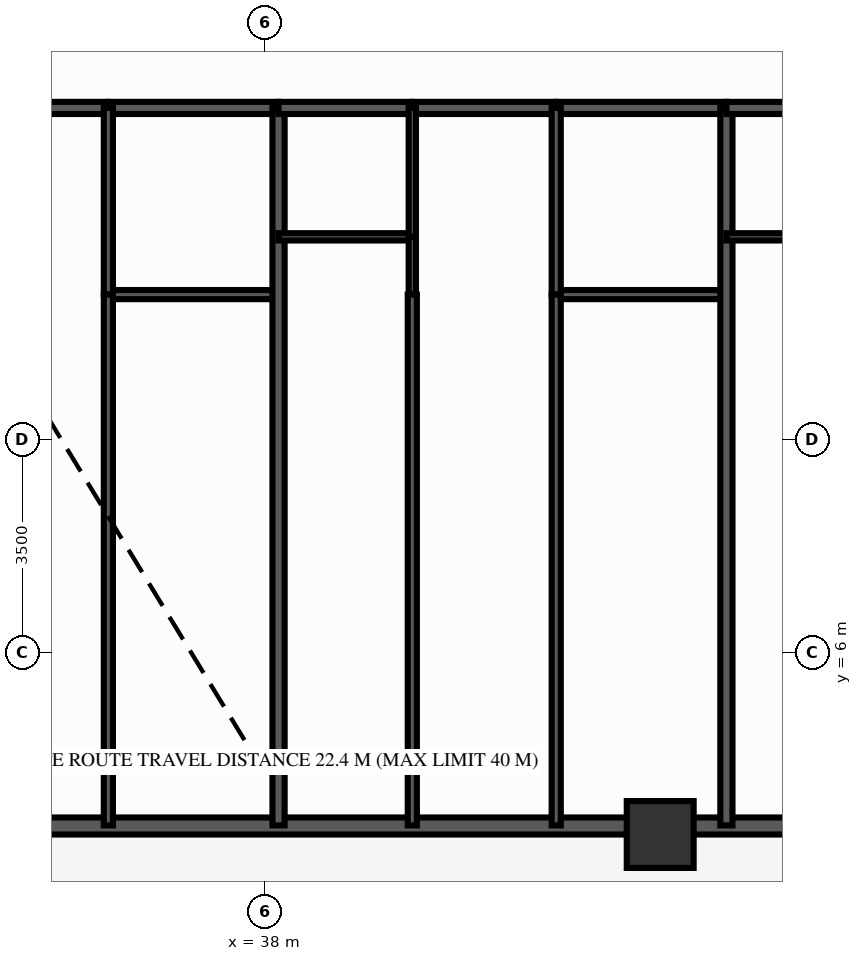
"""IFC4 building model, lengths in metres.
Left out: names, types, materials, properties, quantities, classifications, styles, units other than length and angle.
Written with IfcOpenShell. Run it as: python <this file> out.ifc"""

import sys

from ifc_helpers import new_model, si_unit, direction, frame, frame_2d, origin, origin_2d, place, context, subcontext, project, spatial, rectangle, extrude, source, transform, mapped, element, fill, save


model = new_model("IFC4")
c1 = context("Model", 3, precision=1e-05, world=origin(), true_north=direction((0.0, 1.0)))
c2 = subcontext(c1, "Body", "Model", "MODEL_VIEW")
j1 = project(units=[si_unit("LENGTHUNIT", "METRE"), si_unit("PLANEANGLEUNIT", "RADIAN")], contexts=[c1])
p1 = place(None, origin())
s1 = spatial("IfcSite", under=j1, at=p1, CompositionType="ELEMENT")
p2 = place(p1, origin())
s2 = spatial("IfcBuilding", under=s1, at=p2, CompositionType="ELEMENT")
p3 = place(p2, frame((0.0, 0.0, 19.4)))
s3 = spatial("IfcBuildingStorey", under=s2, at=p3, CompositionType="ELEMENT", Elevation=19.4)
m1 = source(origin(), c2, "Body", "SweptSolid", [
    extrude(rectangle(XDim=1.1, YDim=1.1, at=origin_2d()), origin(), (0.0, 0.0, 1.0), 3.0),
])
p4 = place(p3, frame((44.5, 3.0, 0.0), z_axis=(0.0, 0.0, 1.0), x_axis=(1.0, 0.0, 0.0)))
e1 = element("IfcColumn", 1, at=p4, inside=s3, PredefinedType="COLUMN", context=c2, shape_type="MappedRepresentation", body=[
    mapped(m1, transform((0.0, 0.0, 0.0), scale=1.0)),
])
p5 = place(p3, frame((15.5, 3.14, 0.0), z_axis=(0.0, 0.0, 1.0), x_axis=(1.0, 0.0, 0.0)))
e2 = element("IfcWall", 2, at=p5, inside=s3, PredefinedType="SOLIDWALL", context=c2, shape_type="SweptSolid", body=[
    extrude(rectangle(XDim=45.0, YDim=0.28, at=frame_2d((22.5, 0.0))), origin(), (0.0, 0.0, 1.0), 2.28),
])
p6 = place(p5, frame((0.785, 0.0, 0.25)))
e3 = element("IfcOpeningElement", 3, at=p6, cuts=e2, PredefinedType="OPENING", context=c2, shape_type="SweptSolid", body=[
    extrude(rectangle(XDim=1.2, YDim=1.5, at=frame_2d((0.6, 0.75))), frame((0.0, 0.152, 0.0), z_axis=(0.0, -1.0, 0.0), x_axis=(1.0, 0.0, 0.0)), (0.0, 0.0, 1.0), 0.304),
])
p7 = place(p5, frame((3.033, 0.0, 0.25)))
e4 = element("IfcOpeningElement", 4, at=p7, cuts=e2, PredefinedType="OPENING", context=c2, shape_type="SweptSolid", body=[
    extrude(rectangle(XDim=1.2, YDim=1.5, at=frame_2d((0.6, 0.75))), frame((0.0, 0.152, 0.0), z_axis=(0.0, -1.0, 0.0), x_axis=(1.0, 0.0, 0.0)), (0.0, 0.0, 1.0), 0.304),
])
p8 = place(p5, frame((5.727, 0.0, 0.25)))
e5 = element("IfcOpeningElement", 5, at=p8, cuts=e2, PredefinedType="OPENING", context=c2, shape_type="SweptSolid", body=[
    extrude(rectangle(XDim=1.2, YDim=1.5, at=frame_2d((0.6, 0.75))), frame((0.0, 0.152, 0.0), z_axis=(0.0, -1.0, 0.0), x_axis=(1.0, 0.0, 0.0)), (0.0, 0.0, 1.0), 0.304),
])
p9 = place(p5, frame((8.269, 0.0, 0.25)))
e6 = element("IfcOpeningElement", 6, at=p9, cuts=e2, PredefinedType="OPENING", context=c2, shape_type="SweptSolid", body=[
    extrude(rectangle(XDim=1.2, YDim=1.5, at=frame_2d((0.6, 0.75))), frame((0.0, 0.152, 0.0), z_axis=(0.0, -1.0, 0.0), x_axis=(1.0, 0.0, 0.0)), (0.0, 0.0, 1.0), 0.304),
])
p10 = place(p5, frame((10.621, 0.0, 0.25)))
e7 = element("IfcOpeningElement", 7, at=p10, cuts=e2, PredefinedType="OPENING", context=c2, shape_type="SweptSolid", body=[
    extrude(rectangle(XDim=1.2, YDim=1.5, at=frame_2d((0.6, 0.75))), frame((0.0, 0.152, 0.0), z_axis=(0.0, -1.0, 0.0), x_axis=(1.0, 0.0, 0.0)), (0.0, 0.0, 1.0), 0.304),
])
p11 = place(p5, frame((13.316, 0.0, 0.25)))
e8 = element("IfcOpeningElement", 8, at=p11, cuts=e2, PredefinedType="OPENING", context=c2, shape_type="SweptSolid", body=[
    extrude(rectangle(XDim=1.2, YDim=1.5, at=frame_2d((0.6, 0.75))), frame((0.0, 0.152, 0.0), z_axis=(0.0, -1.0, 0.0), x_axis=(1.0, 0.0, 0.0)), (0.0, 0.0, 1.0), 0.304),
])
p12 = place(p5, frame((16.624, 0.0, 0.25)))
e9 = element("IfcOpeningElement", 9, at=p12, cuts=e2, PredefinedType="OPENING", context=c2, shape_type="SweptSolid", body=[
    extrude(rectangle(XDim=0.7, YDim=1.5, at=frame_2d((0.35, 0.75))), frame((0.0, 0.152, 0.0), z_axis=(0.0, -1.0, 0.0), x_axis=(1.0, 0.0, 0.0)), (0.0, 0.0, 1.0), 0.304),
])
p13 = place(p5, frame((18.141, 0.0, 0.25)))
e10 = element("IfcOpeningElement", 10, at=p13, cuts=e2, PredefinedType="OPENING", context=c2, shape_type="SweptSolid", body=[
    extrude(rectangle(XDim=1.2, YDim=1.5, at=frame_2d((0.6, 0.75))), frame((0.0, 0.152, 0.0), z_axis=(0.0, -1.0, 0.0), x_axis=(1.0, 0.0, 0.0)), (0.0, 0.0, 1.0), 0.304),
])
p14 = place(p5, frame((21.874, 0.0, 0.0), z_axis=(0.0, 0.0, 1.0), x_axis=(-1.0, 0.0, 0.0)))
e11 = element("IfcOpeningElement", 11, at=p14, cuts=e2, PredefinedType="OPENING", context=c2, shape_type="SweptSolid", body=[
    extrude(rectangle(XDim=1.1, YDim=2.15, at=frame_2d((0.55, 1.075))), frame((0.0, 0.152, 0.0), z_axis=(0.0, -1.0, 0.0), x_axis=(1.0, 0.0, 0.0)), (0.0, 0.0, 1.0), 0.304),
])
p15 = place(p5, frame((23.223, 0.0, 0.25)))
e12 = element("IfcOpeningElement", 12, at=p15, cuts=e2, PredefinedType="OPENING", context=c2, shape_type="SweptSolid", body=[
    extrude(rectangle(XDim=1.2, YDim=1.5, at=frame_2d((0.6, 0.75))), frame((0.0, 0.152, 0.0), z_axis=(0.0, -1.0, 0.0), x_axis=(1.0, 0.0, 0.0)), (0.0, 0.0, 1.0), 0.304),
])
p16 = place(p5, frame((25.507, 0.0, 0.25)))
e13 = element("IfcOpeningElement", 13, at=p16, cuts=e2, PredefinedType="OPENING", context=c2, shape_type="SweptSolid", body=[
    extrude(rectangle(XDim=1.2, YDim=1.5, at=frame_2d((0.6, 0.75))), frame((0.0, 0.152, 0.0), z_axis=(0.0, -1.0, 0.0), x_axis=(1.0, 0.0, 0.0)), (0.0, 0.0, 1.0), 0.304),
])
p17 = place(p5, frame((27.6, 0.0, 0.25)))
e14 = element("IfcOpeningElement", 14, at=p17, cuts=e2, PredefinedType="OPENING", context=c2, shape_type="SweptSolid", body=[
    extrude(rectangle(XDim=0.7, YDim=1.5, at=frame_2d((0.35, 0.75))), frame((0.0, 0.152, 0.0), z_axis=(0.0, -1.0, 0.0), x_axis=(1.0, 0.0, 0.0)), (0.0, 0.0, 1.0), 0.304),
])
p18 = place(p5, frame((30.589, 0.0, 0.25)))
e15 = element("IfcOpeningElement", 15, at=p18, cuts=e2, PredefinedType="OPENING", context=c2, shape_type="SweptSolid", body=[
    extrude(rectangle(XDim=1.2, YDim=1.5, at=frame_2d((0.6, 0.75))), frame((0.0, 0.152, 0.0), z_axis=(0.0, -1.0, 0.0), x_axis=(1.0, 0.0, 0.0)), (0.0, 0.0, 1.0), 0.304),
])
p19 = place(p5, frame((32.872, 0.0, 0.25)))
e16 = element("IfcOpeningElement", 16, at=p19, cuts=e2, PredefinedType="OPENING", context=c2, shape_type="SweptSolid", body=[
    extrude(rectangle(XDim=1.2, YDim=1.5, at=frame_2d((0.6, 0.75))), frame((0.0, 0.152, 0.0), z_axis=(0.0, -1.0, 0.0), x_axis=(1.0, 0.0, 0.0)), (0.0, 0.0, 1.0), 0.304),
])
p20 = place(p5, frame((35.455, 0.0, 0.25)))
e17 = element("IfcOpeningElement", 17, at=p20, cuts=e2, PredefinedType="OPENING", context=c2, shape_type="SweptSolid", body=[
    extrude(rectangle(XDim=1.2, YDim=1.5, at=frame_2d((0.6, 0.75))), frame((0.0, 0.152, 0.0), z_axis=(0.0, -1.0, 0.0), x_axis=(1.0, 0.0, 0.0)), (0.0, 0.0, 1.0), 0.304),
])
p21 = place(p5, frame((37.954, 0.0, 0.25)))
e18 = element("IfcOpeningElement", 18, at=p21, cuts=e2, PredefinedType="OPENING", context=c2, shape_type="SweptSolid", body=[
    extrude(rectangle(XDim=1.2, YDim=1.5, at=frame_2d((0.6, 0.75))), frame((0.0, 0.152, 0.0), z_axis=(0.0, -1.0, 0.0), x_axis=(1.0, 0.0, 0.0)), (0.0, 0.0, 1.0), 0.304),
])
p22 = place(p5, frame((40.238, 0.0, 0.25)))
e19 = element("IfcOpeningElement", 19, at=p22, cuts=e2, PredefinedType="OPENING", context=c2, shape_type="SweptSolid", body=[
    extrude(rectangle(XDim=1.2, YDim=1.5, at=frame_2d((0.6, 0.75))), frame((0.0, 0.152, 0.0), z_axis=(0.0, -1.0, 0.0), x_axis=(1.0, 0.0, 0.0)), (0.0, 0.0, 1.0), 0.304),
])
p23 = place(p5, frame((42.716, 0.0, 0.25)))
e20 = element("IfcOpeningElement", 20, at=p23, cuts=e2, PredefinedType="OPENING", context=c2, shape_type="SweptSolid", body=[
    extrude(rectangle(XDim=1.2, YDim=1.5, at=frame_2d((0.6, 0.75))), frame((0.0, 0.152, 0.0), z_axis=(0.0, -1.0, 0.0), x_axis=(1.0, 0.0, 0.0)), (0.0, 0.0, 1.0), 0.304),
])
p24 = place(p3, frame((33.058, 14.95, 0.0), z_axis=(0.0, 0.0, 1.0), x_axis=(1.0, 0.0, 0.0)))
e21 = element("IfcWall", 21, at=p24, inside=s3, PredefinedType="PARTITIONING", context=c2, shape_type="SweptSolid", body=[
    extrude(rectangle(XDim=2.367, YDim=0.2, at=frame_2d((1.183, 0.0))), origin(), (0.0, 0.0, 1.0), 2.79),
])
p25 = place(p24, frame((0.683, 0.0, 0.0)))
e22 = element("IfcOpeningElement", 22, at=p25, cuts=e21, PredefinedType="OPENING", context=c2, shape_type="SweptSolid", body=[
    extrude(rectangle(XDim=1.0, YDim=2.15, at=frame_2d((0.5, 1.075))), frame((0.0, 0.112, 0.0), z_axis=(0.0, -1.0, 0.0), x_axis=(1.0, 0.0, 0.0)), (0.0, 0.0, 1.0), 0.224),
])
p26 = place(p3, frame((35.424, 14.95, 0.0), z_axis=(0.0, 0.0, 1.0), x_axis=(1.0, 0.0, 0.0)))
e23 = element("IfcWall", 23, at=p26, inside=s3, PredefinedType="PARTITIONING", context=c2, shape_type="SweptSolid", body=[
    extrude(rectangle(XDim=2.799, YDim=0.2, at=frame_2d((1.399, 0.0))), origin(), (0.0, 0.0, 1.0), 2.79),
])
p27 = place(p3, frame((35.424, 11.88, 0.0), z_axis=(0.0, 0.0, 1.0), x_axis=(1.0, 0.0, 0.0)))
e24 = element("IfcWall", 24, at=p27, inside=s3, PredefinedType="PARTITIONING", context=c2, shape_type="SweptSolid", body=[
    extrude(rectangle(XDim=2.799, YDim=0.15, at=frame_2d((1.399, 0.0))), origin(), (0.0, 0.0, 1.0), 2.79),
])
p28 = place(p3, frame((35.424, 14.95, 0.0), z_axis=(0.0, 0.0, 1.0), x_axis=(0.0, -1.0, 0.0)))
e25 = element("IfcWall", 25, at=p28, inside=s3, PredefinedType="PARTITIONING", context=c2, shape_type="SweptSolid", body=[
    extrude(rectangle(XDim=3.07, YDim=0.15, at=frame_2d((1.535, 0.0))), origin(), (0.0, 0.0, 1.0), 2.79),
])
p29 = place(p28, frame((1.085, 0.0, 0.0)))
e26 = element("IfcOpeningElement", 26, at=p29, cuts=e25, PredefinedType="OPENING", context=c2, shape_type="SweptSolid", body=[
    extrude(rectangle(XDim=0.9, YDim=2.1, at=frame_2d((0.45, 1.05))), frame((0.0, 0.087, 0.0), z_axis=(0.0, -1.0, 0.0), x_axis=(1.0, 0.0, 0.0)), (0.0, 0.0, 1.0), 0.174),
])
p30 = place(p3, frame((35.424, 11.88, 0.0), z_axis=(0.0, 0.0, 1.0), x_axis=(0.0, -1.0, 0.0)))
e27 = element("IfcWall", 27, at=p30, inside=s3, PredefinedType="PARTITIONING", context=c2, shape_type="SweptSolid", body=[
    extrude(rectangle(XDim=8.73, YDim=0.15, at=frame_2d((4.365, 0.0))), origin(), (0.0, 0.0, 1.0), 2.79),
])
p31 = place(p30, frame((3.609, 0.0, 0.0)))
e28 = element("IfcOpeningElement", 28, at=p31, cuts=e27, PredefinedType="OPENING", context=c2, shape_type="SweptSolid", body=[
    extrude(rectangle(XDim=0.9, YDim=2.1, at=frame_2d((0.45, 1.05))), frame((0.0, 0.087, 0.0), z_axis=(0.0, -1.0, 0.0), x_axis=(1.0, 0.0, 0.0)), (0.0, 0.0, 1.0), 0.174),
])
p32 = place(p3, frame((38.223, 14.95, 0.0), z_axis=(0.0, 0.0, 1.0), x_axis=(0.0, -1.0, 0.0)))
e29 = element("IfcWall", 29, at=p32, inside=s3, PredefinedType="PARTITIONING", context=c2, shape_type="SweptSolid", body=[
    extrude(rectangle(XDim=11.8, YDim=0.2, at=frame_2d((5.9, 0.0))), origin(), (0.0, 0.0, 1.0), 2.79),
])
p33 = place(p3, frame((38.223, 14.95, 0.0), z_axis=(0.0, 0.0, 1.0), x_axis=(1.0, 0.0, 0.0)))
e30 = element("IfcWall", 30, at=p33, inside=s3, PredefinedType="PARTITIONING", context=c2, shape_type="SweptSolid", body=[
    extrude(rectangle(XDim=2.2, YDim=0.2, at=frame_2d((1.1, 0.0))), origin(), (0.0, 0.0, 1.0), 2.79),
])
p34 = place(p3, frame((40.423, 14.95, 0.0), z_axis=(0.0, 0.0, 1.0), x_axis=(1.0, 0.0, 0.0)))
e31 = element("IfcWall", 31, at=p34, inside=s3, PredefinedType="PARTITIONING", context=c2, shape_type="SweptSolid", body=[
    extrude(rectangle(XDim=2.367, YDim=0.2, at=frame_2d((1.183, 0.0))), origin(), (0.0, 0.0, 1.0), 2.79),
])
p35 = place(p34, frame((0.683, 0.0, 0.0)))
e32 = element("IfcOpeningElement", 32, at=p35, cuts=e31, PredefinedType="OPENING", context=c2, shape_type="SweptSolid", body=[
    extrude(rectangle(XDim=1.0, YDim=2.15, at=frame_2d((0.5, 1.075))), frame((0.0, 0.112, 0.0), z_axis=(0.0, -1.0, 0.0), x_axis=(1.0, 0.0, 0.0)), (0.0, 0.0, 1.0), 0.224),
])
p36 = place(p3, frame((42.79, 14.95, 0.0), z_axis=(0.0, 0.0, 1.0), x_axis=(1.0, 0.0, 0.0)))
e33 = element("IfcWall", 33, at=p36, inside=s3, PredefinedType="PARTITIONING", context=c2, shape_type="SweptSolid", body=[
    extrude(rectangle(XDim=2.799, YDim=0.2, at=frame_2d((1.399, 0.0))), origin(), (0.0, 0.0, 1.0), 2.79),
])
p37 = place(p3, frame((38.223, 12.83, 0.0), z_axis=(0.0, 0.0, 1.0), x_axis=(1.0, 0.0, 0.0)))
e34 = element("IfcWall", 34, at=p37, inside=s3, PredefinedType="PARTITIONING", context=c2, shape_type="SweptSolid", body=[
    extrude(rectangle(XDim=2.2, YDim=0.12, at=frame_2d((1.1, 0.0))), origin(), (0.0, 0.0, 1.0), 2.79),
])
p38 = place(p3, frame((42.79, 11.88, 0.0), z_axis=(0.0, 0.0, 1.0), x_axis=(1.0, 0.0, 0.0)))
e35 = element("IfcWall", 35, at=p38, inside=s3, PredefinedType="PARTITIONING", context=c2, shape_type="SweptSolid", body=[
    extrude(rectangle(XDim=2.799, YDim=0.15, at=frame_2d((1.399, 0.0))), origin(), (0.0, 0.0, 1.0), 2.79),
])
p39 = place(p3, frame((40.423, 14.95, 0.0), z_axis=(0.0, 0.0, 1.0), x_axis=(0.0, -1.0, 0.0)))
e36 = element("IfcWall", 36, at=p39, inside=s3, PredefinedType="PARTITIONING", context=c2, shape_type="SweptSolid", body=[
    extrude(rectangle(XDim=2.12, YDim=0.12, at=frame_2d((1.06, 0.0))), origin(), (0.0, 0.0, 1.0), 2.79),
])
p40 = place(p39, frame((0.635, 0.0, 0.0)))
e37 = element("IfcOpeningElement", 37, at=p40, cuts=e36, PredefinedType="OPENING", context=c2, shape_type="SweptSolid", body=[
    extrude(rectangle(XDim=0.85, YDim=2.05, at=frame_2d((0.425, 1.025))), frame((0.0, 0.072, 0.0), z_axis=(0.0, -1.0, 0.0), x_axis=(1.0, 0.0, 0.0)), (0.0, 0.0, 1.0), 0.144),
])
p41 = place(p3, frame((40.423, 12.83, 0.0), z_axis=(0.0, 0.0, 1.0), x_axis=(0.0, -1.0, 0.0)))
e38 = element("IfcWall", 38, at=p41, inside=s3, PredefinedType="PARTITIONING", context=c2, shape_type="SweptSolid", body=[
    extrude(rectangle(XDim=0.95, YDim=0.12, at=frame_2d((0.475, 0.0))), origin(), (0.0, 0.0, 1.0), 2.79),
])
p42 = place(p3, frame((40.423, 11.88, 0.0), z_axis=(0.0, 0.0, 1.0), x_axis=(0.0, -1.0, 0.0)))
e39 = element("IfcWall", 39, at=p42, inside=s3, PredefinedType="PARTITIONING", context=c2, shape_type="SweptSolid", body=[
    extrude(rectangle(XDim=8.73, YDim=0.15, at=frame_2d((4.365, 0.0))), origin(), (0.0, 0.0, 1.0), 2.79),
])
p43 = place(p42, frame((3.609, 0.0, 0.0)))
e40 = element("IfcOpeningElement", 40, at=p43, cuts=e39, PredefinedType="OPENING", context=c2, shape_type="SweptSolid", body=[
    extrude(rectangle(XDim=0.9, YDim=2.1, at=frame_2d((0.45, 1.05))), frame((0.0, 0.087, 0.0), z_axis=(0.0, -1.0, 0.0), x_axis=(1.0, 0.0, 0.0)), (0.0, 0.0, 1.0), 0.174),
])
p44 = place(p3, frame((42.79, 14.95, 0.0), z_axis=(0.0, 0.0, 1.0), x_axis=(0.0, -1.0, 0.0)))
e41 = element("IfcWall", 41, at=p44, inside=s3, PredefinedType="PARTITIONING", context=c2, shape_type="SweptSolid", body=[
    extrude(rectangle(XDim=3.07, YDim=0.15, at=frame_2d((1.535, 0.0))), origin(), (0.0, 0.0, 1.0), 2.79),
])
p45 = place(p44, frame((1.085, 0.0, 0.0)))
e42 = element("IfcOpeningElement", 42, at=p45, cuts=e41, PredefinedType="OPENING", context=c2, shape_type="SweptSolid", body=[
    extrude(rectangle(XDim=0.9, YDim=2.1, at=frame_2d((0.45, 1.05))), frame((0.0, 0.087, 0.0), z_axis=(0.0, -1.0, 0.0), x_axis=(1.0, 0.0, 0.0)), (0.0, 0.0, 1.0), 0.174),
])
p46 = place(p3, frame((42.79, 11.88, 0.0), z_axis=(0.0, 0.0, 1.0), x_axis=(0.0, -1.0, 0.0)))
e43 = element("IfcWall", 43, at=p46, inside=s3, PredefinedType="PARTITIONING", context=c2, shape_type="SweptSolid", body=[
    extrude(rectangle(XDim=8.73, YDim=0.15, at=frame_2d((4.365, 0.0))), origin(), (0.0, 0.0, 1.0), 2.79),
])
p47 = place(p46, frame((3.609, 0.0, 0.0)))
e44 = element("IfcOpeningElement", 44, at=p47, cuts=e43, PredefinedType="OPENING", context=c2, shape_type="SweptSolid", body=[
    extrude(rectangle(XDim=0.9, YDim=2.1, at=frame_2d((0.45, 1.05))), frame((0.0, 0.087, 0.0), z_axis=(0.0, -1.0, 0.0), x_axis=(1.0, 0.0, 0.0)), (0.0, 0.0, 1.0), 0.174),
])
p48 = place(p3, frame((45.589, 14.95, 0.0), z_axis=(0.0, 0.0, 1.0), x_axis=(0.0, -1.0, 0.0)))
e45 = element("IfcWall", 45, at=p48, inside=s3, PredefinedType="PARTITIONING", context=c2, shape_type="SweptSolid", body=[
    extrude(rectangle(XDim=11.8, YDim=0.2, at=frame_2d((5.9, 0.0))), origin(), (0.0, 0.0, 1.0), 2.24),
])
p49 = place(p3, frame((45.589, 14.95, 0.0), z_axis=(0.0, 0.0, 1.0), x_axis=(1.0, 0.0, 0.0)))
e46 = element("IfcWall", 46, at=p49, inside=s3, PredefinedType="PARTITIONING", context=c2, shape_type="SweptSolid", body=[
    extrude(rectangle(XDim=2.2, YDim=0.2, at=frame_2d((1.1, 0.0))), origin(), (0.0, 0.0, 1.0), 2.79),
])
p50 = place(p3, frame((45.589, 12.83, 0.0), z_axis=(0.0, 0.0, 1.0), x_axis=(1.0, 0.0, 0.0)))
e47 = element("IfcWall", 47, at=p50, inside=s3, PredefinedType="PARTITIONING", context=c2, shape_type="SweptSolid", body=[
    extrude(rectangle(XDim=2.2, YDim=0.12, at=frame_2d((1.1, 0.0))), origin(), (0.0, 0.0, 1.0), 2.79),
])
m2 = source(origin(), c2, "Body", "SweptSolid", [
    extrude(rectangle(XDim=1.2, YDim=1.5, at=frame_2d((0.6, 0.75))), frame((0.0, 0.03, 0.0), z_axis=(0.0, -1.0, 0.0), x_axis=(1.0, 0.0, 0.0)), (0.0, 0.0, 1.0), 0.06),
])
p51 = place(p13, origin())
e48 = element("IfcWindow", 48, at=p51, inside=s3, PartitioningType="SINGLE_PANEL", PredefinedType="WINDOW", context=c2, shape_type="MappedRepresentation", body=[
    mapped(m2, transform((0.0, 0.0, 0.0), scale=1.0)),
])
fill(e10, e48)
m3 = source(origin(), c2, "Body", "SweptSolid", [
    extrude(rectangle(XDim=1.1, YDim=2.15, at=frame_2d((0.55, 1.075))), frame((0.0, 0.025, 0.0), z_axis=(0.0, -1.0, 0.0), x_axis=(1.0, 0.0, 0.0)), (0.0, 0.0, 1.0), 0.05),
])
p52 = place(p14, origin())
e49 = element("IfcDoor", 49, at=p52, inside=s3, OperationType="SINGLE_SWING_LEFT", PredefinedType="DOOR", context=c2, shape_type="MappedRepresentation", body=[
    mapped(m3, transform((0.0, 0.0, 0.0), scale=1.0)),
])
fill(e11, e49)
p53 = place(p15, origin())
e50 = element("IfcWindow", 50, at=p53, inside=s3, PartitioningType="SINGLE_PANEL", PredefinedType="WINDOW", context=c2, shape_type="MappedRepresentation", body=[
    mapped(m2, transform((0.0, 0.0, 0.0), scale=1.0)),
])
fill(e12, e50)
p54 = place(p16, origin())
e51 = element("IfcWindow", 51, at=p54, inside=s3, PartitioningType="SINGLE_PANEL", PredefinedType="WINDOW", context=c2, shape_type="MappedRepresentation", body=[
    mapped(m2, transform((0.0, 0.0, 0.0), scale=1.0)),
])
fill(e13, e51)
m4 = source(origin(), c2, "Body", "SweptSolid", [
    extrude(rectangle(XDim=0.7, YDim=1.5, at=frame_2d((0.35, 0.75))), frame((0.0, 0.03, 0.0), z_axis=(0.0, -1.0, 0.0), x_axis=(1.0, 0.0, 0.0)), (0.0, 0.0, 1.0), 0.06),
])
p55 = place(p17, origin())
e52 = element("IfcWindow", 52, at=p55, inside=s3, PartitioningType="SINGLE_PANEL", PredefinedType="WINDOW", context=c2, shape_type="MappedRepresentation", body=[
    mapped(m4, transform((0.0, 0.0, 0.0), scale=1.0)),
])
fill(e14, e52)
p56 = place(p18, origin())
e53 = element("IfcWindow", 53, at=p56, inside=s3, PartitioningType="SINGLE_PANEL", PredefinedType="WINDOW", context=c2, shape_type="MappedRepresentation", body=[
    mapped(m2, transform((0.0, 0.0, 0.0), scale=1.0)),
])
fill(e15, e53)
m5 = source(origin(), c2, "Body", "SweptSolid", [
    extrude(rectangle(XDim=1.0, YDim=2.15, at=frame_2d((0.5, 1.075))), frame((0.0, 0.025, 0.0), z_axis=(0.0, -1.0, 0.0), x_axis=(1.0, 0.0, 0.0)), (0.0, 0.0, 1.0), 0.05),
])
p57 = place(p25, origin())
e54 = element("IfcDoor", 54, at=p57, inside=s3, OperationType="SINGLE_SWING_LEFT", PredefinedType="DOOR", context=c2, shape_type="MappedRepresentation", body=[
    mapped(m5, transform((0.0, 0.0, 0.0), scale=1.0)),
])
fill(e22, e54)
m6 = source(origin(), c2, "Body", "SweptSolid", [
    extrude(rectangle(XDim=0.9, YDim=2.1, at=frame_2d((0.45, 1.05))), frame((0.0, 0.025, 0.0), z_axis=(0.0, -1.0, 0.0), x_axis=(1.0, 0.0, 0.0)), (0.0, 0.0, 1.0), 0.05),
])
p58 = place(p29, origin())
e55 = element("IfcDoor", 55, at=p58, inside=s3, OperationType="SINGLE_SWING_RIGHT", PredefinedType="DOOR", context=c2, shape_type="MappedRepresentation", body=[
    mapped(m6, transform((0.0, 0.0, 0.0), scale=1.0)),
])
fill(e26, e55)
p59 = place(p31, origin())
e56 = element("IfcDoor", 56, at=p59, inside=s3, OperationType="SINGLE_SWING_LEFT", PredefinedType="DOOR", context=c2, shape_type="MappedRepresentation", body=[
    mapped(m6, transform((0.0, 0.0, 0.0), scale=1.0)),
])
fill(e28, e56)
p60 = place(p35, origin())
e57 = element("IfcDoor", 57, at=p60, inside=s3, OperationType="SINGLE_SWING_RIGHT", PredefinedType="DOOR", context=c2, shape_type="MappedRepresentation", body=[
    mapped(m5, transform((0.0, 0.0, 0.0), scale=1.0)),
])
fill(e32, e57)
m7 = source(origin(), c2, "Body", "SweptSolid", [
    extrude(rectangle(XDim=0.85, YDim=2.05, at=frame_2d((0.425, 1.025))), frame((0.0, 0.025, 0.0), z_axis=(0.0, -1.0, 0.0), x_axis=(1.0, 0.0, 0.0)), (0.0, 0.0, 1.0), 0.05),
])
p61 = place(p40, origin())
e58 = element("IfcDoor", 58, at=p61, inside=s3, OperationType="SINGLE_SWING_LEFT", PredefinedType="DOOR", context=c2, shape_type="MappedRepresentation", body=[
    mapped(m7, transform((0.0, 0.0, 0.0), scale=1.0)),
])
fill(e37, e58)
p62 = place(p43, origin())
e59 = element("IfcDoor", 59, at=p62, inside=s3, OperationType="SINGLE_SWING_RIGHT", PredefinedType="DOOR", context=c2, shape_type="MappedRepresentation", body=[
    mapped(m6, transform((0.0, 0.0, 0.0), scale=1.0)),
])
fill(e40, e59)
p63 = place(p45, origin())
e60 = element("IfcDoor", 60, at=p63, inside=s3, OperationType="SINGLE_SWING_LEFT", PredefinedType="DOOR", context=c2, shape_type="MappedRepresentation", body=[
    mapped(m6, transform((0.0, 0.0, 0.0), scale=1.0)),
])
fill(e42, e60)
p64 = place(p47, origin())
e61 = element("IfcDoor", 61, at=p64, inside=s3, OperationType="SINGLE_SWING_RIGHT", PredefinedType="DOOR", context=c2, shape_type="MappedRepresentation", body=[
    mapped(m6, transform((0.0, 0.0, 0.0), scale=1.0)),
])
fill(e44, e61)
save(model, sys.argv[1])
